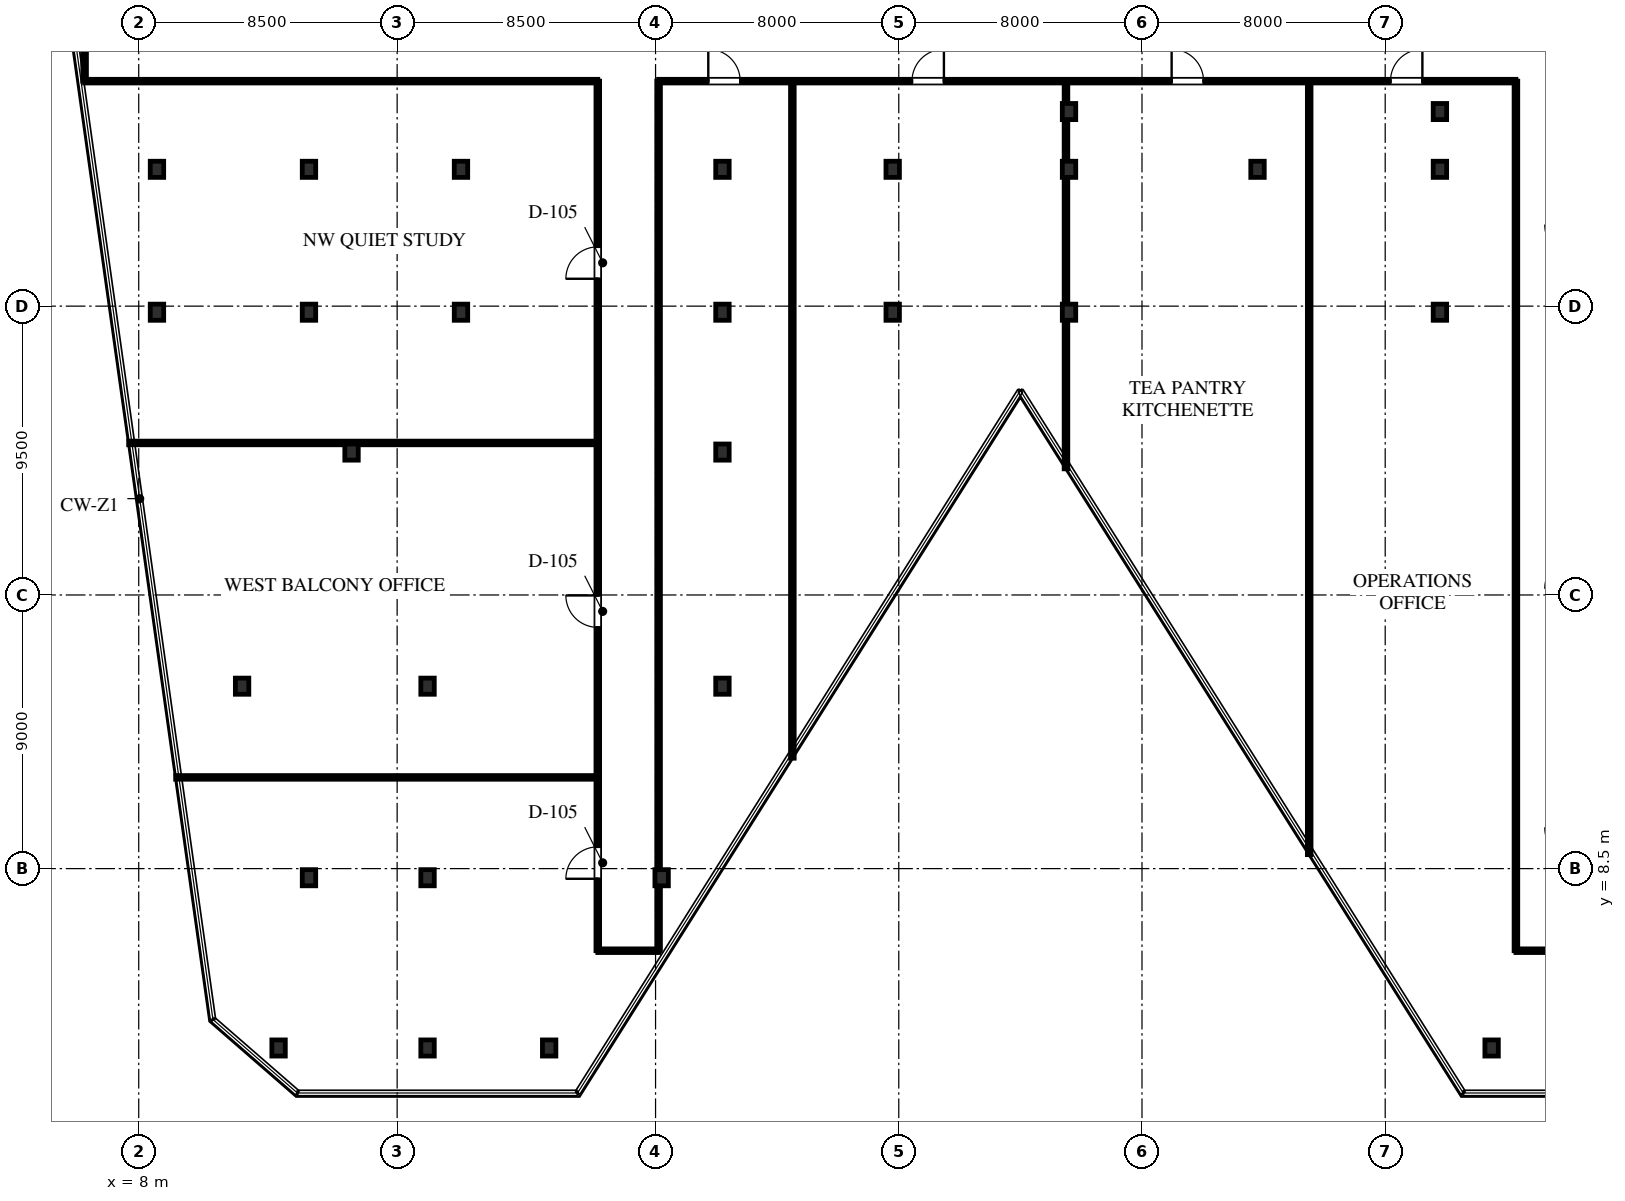
"""IFC4 building model, lengths in metres.
Left out: names, types, materials, properties, quantities, classifications, styles, units other than length and angle.
Written with IfcOpenShell. Run it as: python <this file> out.ifc"""

import sys

from ifc_helpers import new_model, si_unit, direction, frame, frame_2d, origin, origin_2d, place, context, subcontext, project, spatial, rectangle, i_section, extrude, element, fill, save


model = new_model("IFC4")
c1 = context("Model", 3, precision=1e-05, world=origin(), true_north=direction((0.0, 1.0)))
c2 = subcontext(c1, "Body", "Model", "MODEL_VIEW")
j1 = project(units=[si_unit("LENGTHUNIT", "METRE"), si_unit("PLANEANGLEUNIT", "RADIAN")], contexts=[c1])
p1 = place(None, origin())
s1 = spatial("IfcSite", under=j1, at=p1, CompositionType="ELEMENT")
p2 = place(p1, origin())
s2 = spatial("IfcBuilding", under=s1, at=p2, CompositionType="ELEMENT")
p3 = place(p2, frame((0.0, 0.0, 45.5)))
s3 = spatial("IfcBuildingStorey", under=s2, at=p3, CompositionType="ELEMENT", Elevation=45.5)
for number, where, z_axis, x_axis in (
    (1, (12.6, 2.6, 0.0), (0.0, 0.0, 1.0), (1.0, 0.0, 0.0)),
    (2, (15.0, 22.2, 0.0), (0.0, 0.0, 1.0), (1.0, 0.0, 0.0)),
    (3, (27.2, 22.2, 0.0), (0.0, 0.0, 1.0), (1.0, 0.0, 0.0)),
    (4, (8.6, 26.8, 0.0), (0.0, 0.0, 1.0), (1.0, 0.0, 0.0)),
    (5, (13.6, 26.8, 0.0), (0.0, 0.0, 1.0), (1.0, 0.0, 0.0)),
    (6, (18.6, 26.8, 0.0), (0.0, 0.0, 1.0), (1.0, 0.0, 0.0)),
    (7, (27.2, 26.8, 0.0), (0.0, 0.0, 1.0), (1.0, 0.0, 0.0)),
    (8, (32.8, 26.8, 0.0), (0.0, 0.0, 1.0), (1.0, 0.0, 0.0)),
    (9, (38.6, 26.8, 0.0), (0.0, 0.0, 1.0), (1.0, 0.0, 0.0)),
    (10, (50.8, 26.8, 0.0), (0.0, 0.0, 1.0), (1.0, 0.0, 0.0)),
    (11, (8.6, 31.5, 0.0), (0.0, 0.0, 1.0), (1.0, 0.0, 0.0)),
    (12, (13.6, 31.5, 0.0), (0.0, 0.0, 1.0), (1.0, 0.0, 0.0)),
    (13, (17.5, 2.6, 0.0), (0.0, 0.0, 1.0), (1.0, 0.0, 0.0)),
    (14, (18.6, 31.5, 0.0), (0.0, 0.0, 1.0), (1.0, 0.0, 0.0)),
    (15, (27.2, 31.5, 0.0), (0.0, 0.0, 1.0), (1.0, 0.0, 0.0)),
    (16, (32.8, 31.5, 0.0), (0.0, 0.0, 1.0), (1.0, 0.0, 0.0)),
    (17, (38.6, 31.5, 0.0), (0.0, 0.0, 1.0), (1.0, 0.0, 0.0)),
    (18, (44.8, 31.5, 0.0), (0.0, 0.0, 1.0), (1.0, 0.0, 0.0)),
    (19, (50.8, 31.5, 0.0), (0.0, 0.0, 1.0), (1.0, 0.0, 0.0)),
    (20, (21.5, 2.6, 0.0), (0.0, 0.0, 1.0), (1.0, 0.0, 0.0)),
    (21, (52.5, 2.6, 0.0), (0.0, 0.0, 1.0), (1.0, 0.0, 0.0)),
    (22, (13.6, 8.2, 0.0), (0.0, 0.0, 1.0), (1.0, 0.0, 0.0)),
    (23, (17.5, 8.2, 0.0), (0.0, 0.0, 1.0), (1.0, 0.0, 0.0)),
    (24, (25.2, 8.2, 0.0), (0.0, 0.0, 1.0), (1.0, 0.0, 0.0)),
    (25, (11.4, 14.5, 0.0), (0.0, 0.0, 1.0), (1.0, 0.0, 0.0)),
    (26, (17.5, 14.5, 0.0), (0.0, 0.0, 1.0), (1.0, 0.0, 0.0)),
    (27, (27.2, 14.5, 0.0), (0.0, 0.0, 1.0), (1.0, 0.0, 0.0)),
    (28, (38.6, 33.4, 0.0), (0.0, 0.0, 1.0), (1.0, 0.0, 0.0)),
    (29, (50.8, 33.4, 0.0), (0.0, 0.0, 1.0), (1.0, 0.0, 0.0)),
):
    element("IfcColumn", number, at=place(p3, frame(where, z_axis=z_axis, x_axis=x_axis)), inside=s3, PredefinedType="COLUMN", context=c2, shape_type="SweptSolid", body=[
        extrude(i_section(OverallWidth=0.442, OverallDepth=0.531, WebThickness=0.066, FlangeThickness=0.106, FilletRadius=0.03, at=origin_2d()), origin(), (0.0, 0.0, 1.0), 4.0),
    ])
p4 = place(p3, frame((6.22, 34.4, 0.0), z_axis=(0.0, 0.0, 1.0), x_axis=(1.0, 0.0, 0.0)))
e30 = element("IfcWall", 30, at=p4, inside=s3, PredefinedType="PARTITIONING", context=c2, shape_type="SweptSolid", body=[
    extrude(rectangle(XDim=16.88, YDim=0.12, at=frame_2d((8.44, 0.0))), origin(), (0.0, 0.0, 1.0), 2.813),
])
p5 = place(p3, frame((25.1, 34.4, 0.0), z_axis=(0.0, 0.0, 1.0), x_axis=(1.0, 0.0, 0.0)))
e31 = element("IfcWall", 31, at=p5, inside=s3, PredefinedType="PARTITIONING", context=c2, shape_type="SweptSolid", body=[
    extrude(rectangle(XDim=28.2, YDim=0.12, at=frame_2d((14.1, 0.0))), origin(), (0.0, 0.0, 1.0), 2.813),
])
p6 = place(p5, frame((1.634, 0.0, 0.0)))
e32 = element("IfcOpeningElement", 32, at=p6, cuts=e31, PredefinedType="OPENING", context=c2, shape_type="SweptSolid", body=[
    extrude(rectangle(XDim=1.05, YDim=2.2, at=frame_2d((0.525, 1.1))), frame((0.0, 0.07, 0.0), z_axis=(0.0, -1.0, 0.0), x_axis=(1.0, 0.0, 0.0)), (0.0, 0.0, 1.0), 0.14),
])
p7 = place(p5, frame((8.335, 0.0, 0.0)))
e33 = element("IfcOpeningElement", 33, at=p7, cuts=e31, PredefinedType="OPENING", context=c2, shape_type="SweptSolid", body=[
    extrude(rectangle(XDim=1.05, YDim=2.2, at=frame_2d((0.525, 1.1))), frame((0.0, 0.07, 0.0), z_axis=(0.0, -1.0, 0.0), x_axis=(1.0, 0.0, 0.0)), (0.0, 0.0, 1.0), 0.14),
])
p8 = place(p5, frame((16.875, 0.0, 0.0)))
e34 = element("IfcOpeningElement", 34, at=p8, cuts=e31, PredefinedType="OPENING", context=c2, shape_type="SweptSolid", body=[
    extrude(rectangle(XDim=1.05, YDim=2.2, at=frame_2d((0.525, 1.1))), frame((0.0, 0.07, 0.0), z_axis=(0.0, -1.0, 0.0), x_axis=(1.0, 0.0, 0.0)), (0.0, 0.0, 1.0), 0.14),
])
p9 = place(p5, frame((24.073, 0.0, 0.0)))
e35 = element("IfcOpeningElement", 35, at=p9, cuts=e31, PredefinedType="OPENING", context=c2, shape_type="SweptSolid", body=[
    extrude(rectangle(XDim=1.05, YDim=2.2, at=frame_2d((0.525, 1.1))), frame((0.0, 0.07, 0.0), z_axis=(0.0, -1.0, 0.0), x_axis=(1.0, 0.0, 0.0)), (0.0, 0.0, 1.0), 0.14),
])
p10 = place(p3, frame((6.22, 34.4, 0.0), z_axis=(0.0, 0.0, 1.0), x_axis=(0.0, 1.0, 0.0)))
e36 = element("IfcWall", 36, at=p10, inside=s3, PredefinedType="PARTITIONING", context=c2, shape_type="SweptSolid", body=[
    extrude(rectangle(XDim=3.65, YDim=0.12, at=frame_2d((1.825, 0.0))), origin(), (0.0, 0.0, 1.0), 3.74),
])
p11 = place(p3, frame((23.1, 5.8, 0.0), z_axis=(0.0, 0.0, 1.0), x_axis=(0.0, 1.0, 0.0)))
e37 = element("IfcWall", 37, at=p11, inside=s3, PredefinedType="PARTITIONING", context=c2, shape_type="SweptSolid", body=[
    extrude(rectangle(XDim=28.6, YDim=0.12, at=frame_2d((14.3, 0.0))), origin(), (0.0, 0.0, 1.0), 2.813),
])
p12 = place(p11, frame((2.365, 0.0, 0.0)))
e38 = element("IfcOpeningElement", 38, at=p12, cuts=e37, PredefinedType="OPENING", context=c2, shape_type="SweptSolid", body=[
    extrude(rectangle(XDim=1.05, YDim=2.2, at=frame_2d((0.525, 1.1))), frame((0.0, 0.07, 0.0), z_axis=(0.0, -1.0, 0.0), x_axis=(1.0, 0.0, 0.0)), (0.0, 0.0, 1.0), 0.14),
])
p13 = place(p11, frame((10.635, 0.0, 0.0)))
e39 = element("IfcOpeningElement", 39, at=p13, cuts=e37, PredefinedType="OPENING", context=c2, shape_type="SweptSolid", body=[
    extrude(rectangle(XDim=1.05, YDim=2.2, at=frame_2d((0.525, 1.1))), frame((0.0, 0.07, 0.0), z_axis=(0.0, -1.0, 0.0), x_axis=(1.0, 0.0, 0.0)), (0.0, 0.0, 1.0), 0.14),
])
p14 = place(p11, frame((22.1, 0.0, 0.0)))
e40 = element("IfcOpeningElement", 40, at=p14, cuts=e37, PredefinedType="OPENING", context=c2, shape_type="SweptSolid", body=[
    extrude(rectangle(XDim=1.05, YDim=2.2, at=frame_2d((0.525, 1.1))), frame((0.0, 0.07, 0.0), z_axis=(0.0, -1.0, 0.0), x_axis=(1.0, 0.0, 0.0)), (0.0, 0.0, 1.0), 0.14),
])
p15 = place(p3, frame((25.1, 5.8, 0.0), z_axis=(0.0, 0.0, 1.0), x_axis=(0.0, 1.0, 0.0)))
e41 = element("IfcWall", 41, at=p15, inside=s3, PredefinedType="PARTITIONING", context=c2, shape_type="SweptSolid", body=[
    extrude(rectangle(XDim=28.6, YDim=0.12, at=frame_2d((14.3, 0.0))), origin(), (0.0, 0.0, 1.0), 2.813),
])
p16 = place(p3, frame((23.1, 5.8, 0.0), z_axis=(0.0, 0.0, 1.0), x_axis=(1.0, 0.0, 0.0)))
e42 = element("IfcWall", 42, at=p16, inside=s3, PredefinedType="PARTITIONING", context=c2, shape_type="SweptSolid", body=[
    extrude(rectangle(XDim=2.0, YDim=0.12, at=frame_2d((1.0, 0.0))), origin(), (0.0, 0.0, 1.0), 2.978),
])
p17 = place(p3, frame((53.3, 5.8, 0.0), z_axis=(0.0, 0.0, 1.0), x_axis=(0.0, 1.0, 0.0)))
e43 = element("IfcWall", 43, at=p17, inside=s3, PredefinedType="PARTITIONING", context=c2, shape_type="SweptSolid", body=[
    extrude(rectangle(XDim=28.6, YDim=0.12, at=frame_2d((14.3, 0.0))), origin(), (0.0, 0.0, 1.0), 2.813),
])
p18 = place(p3, frame((53.3, 5.8, 0.0), z_axis=(0.0, 0.0, 1.0), x_axis=(1.0, 0.0, 0.0)))
e44 = element("IfcWall", 44, at=p18, inside=s3, PredefinedType="PARTITIONING", context=c2, shape_type="SweptSolid", body=[
    extrude(rectangle(XDim=2.0, YDim=0.12, at=frame_2d((1.0, 0.0))), origin(), (0.0, 0.0, 1.0), 2.978),
])
p19 = place(p3, frame((9.215, 11.5, 0.0), z_axis=(0.0, 0.0, 1.0), x_axis=(1.0, 0.0, 0.0)))
e45 = element("IfcWall", 45, at=p19, inside=s3, PredefinedType="PARTITIONING", context=c2, shape_type="SweptSolid", body=[
    extrude(rectangle(XDim=13.817, YDim=0.12, at=frame_2d((6.908, 0.0))), origin(), (0.0, 0.0, 1.0), 2.813),
])
p20 = place(p3, frame((7.669, 22.5, 0.0), z_axis=(0.0, 0.0, 1.0), x_axis=(1.0, 0.0, 0.0)))
e46 = element("IfcWall", 46, at=p20, inside=s3, PredefinedType="PARTITIONING", context=c2, shape_type="SweptSolid", body=[
    extrude(rectangle(XDim=15.363, YDim=0.12, at=frame_2d((7.681, 0.0))), origin(), (0.0, 0.0, 1.0), 2.978),
])
p21 = place(p3, frame((29.5, 12.132, 0.0), z_axis=(0.0, 0.0, 1.0), x_axis=(0.0, 1.0, 0.0)))
e47 = element("IfcWall", 47, at=p21, inside=s3, PredefinedType="PARTITIONING", context=c2, shape_type="SweptSolid", body=[
    extrude(rectangle(XDim=22.2, YDim=0.12, at=frame_2d((11.1, 0.0))), origin(), (0.0, 0.0, 1.0), 2.813),
])
p22 = place(p3, frame((38.5, 21.649, 0.0), z_axis=(0.0, 0.0, 1.0), x_axis=(0.0, 1.0, 0.0)))
e48 = element("IfcWall", 48, at=p22, inside=s3, PredefinedType="PARTITIONING", context=c2, shape_type="SweptSolid", body=[
    extrude(rectangle(XDim=12.683, YDim=0.12, at=frame_2d((6.342, 0.0))), origin(), (0.0, 0.0, 1.0), 2.813),
])
p23 = place(p3, frame((46.5, 8.959, 0.0), z_axis=(0.0, 0.0, 1.0), x_axis=(0.0, 1.0, 0.0)))
e49 = element("IfcWall", 49, at=p23, inside=s3, PredefinedType="PARTITIONING", context=c2, shape_type="SweptSolid", body=[
    extrude(rectangle(XDim=25.373, YDim=0.12, at=frame_2d((12.687, 0.0))), origin(), (0.0, 0.0, 1.0), 2.813),
])
p24 = place(p12, origin())
e50 = element("IfcDoor", 50, at=p24, inside=s3, OperationType="SINGLE_SWING_LEFT", PredefinedType="DOOR", context=c2, shape_type="SweptSolid", body=[
    extrude(rectangle(XDim=1.05, YDim=2.2, at=frame_2d((0.525, 1.1))), frame((0.0, 0.025, 0.0), z_axis=(0.0, -1.0, 0.0), x_axis=(1.0, 0.0, 0.0)), (0.0, 0.0, 1.0), 0.05),
])
fill(e38, e50)
p25 = place(p13, origin())
e51 = element("IfcDoor", 51, at=p25, inside=s3, OperationType="SINGLE_SWING_RIGHT", PredefinedType="DOOR", context=c2, shape_type="SweptSolid", body=[
    extrude(rectangle(XDim=1.05, YDim=2.2, at=frame_2d((0.525, 1.1))), frame((0.0, 0.025, 0.0), z_axis=(0.0, -1.0, 0.0), x_axis=(1.0, 0.0, 0.0)), (0.0, 0.0, 1.0), 0.05),
])
fill(e39, e51)
p26 = place(p14, origin())
e52 = element("IfcDoor", 52, at=p26, inside=s3, OperationType="SINGLE_SWING_LEFT", PredefinedType="DOOR", context=c2, shape_type="SweptSolid", body=[
    extrude(rectangle(XDim=1.05, YDim=2.2, at=frame_2d((0.525, 1.1))), frame((0.0, 0.025, 0.0), z_axis=(0.0, -1.0, 0.0), x_axis=(1.0, 0.0, 0.0)), (0.0, 0.0, 1.0), 0.05),
])
fill(e40, e52)
p27 = place(p6, origin())
e53 = element("IfcDoor", 53, at=p27, inside=s3, OperationType="SINGLE_SWING_LEFT", PredefinedType="DOOR", context=c2, shape_type="SweptSolid", body=[
    extrude(rectangle(XDim=1.05, YDim=2.2, at=frame_2d((0.525, 1.1))), frame((0.0, 0.025, 0.0), z_axis=(0.0, -1.0, 0.0), x_axis=(1.0, 0.0, 0.0)), (0.0, 0.0, 1.0), 0.05),
])
fill(e32, e53)
p28 = place(p7, origin())
e54 = element("IfcDoor", 54, at=p28, inside=s3, OperationType="SINGLE_SWING_RIGHT", PredefinedType="DOOR", context=c2, shape_type="SweptSolid", body=[
    extrude(rectangle(XDim=1.05, YDim=2.2, at=frame_2d((0.525, 1.1))), frame((0.0, 0.025, 0.0), z_axis=(0.0, -1.0, 0.0), x_axis=(1.0, 0.0, 0.0)), (0.0, 0.0, 1.0), 0.05),
])
fill(e33, e54)
p29 = place(p8, origin())
e55 = element("IfcDoor", 55, at=p29, inside=s3, OperationType="SINGLE_SWING_LEFT", PredefinedType="DOOR", context=c2, shape_type="SweptSolid", body=[
    extrude(rectangle(XDim=1.05, YDim=2.2, at=frame_2d((0.525, 1.1))), frame((0.0, 0.025, 0.0), z_axis=(0.0, -1.0, 0.0), x_axis=(1.0, 0.0, 0.0)), (0.0, 0.0, 1.0), 0.05),
])
fill(e34, e55)
p30 = place(p9, origin())
e56 = element("IfcDoor", 56, at=p30, inside=s3, OperationType="SINGLE_SWING_RIGHT", PredefinedType="DOOR", context=c2, shape_type="SweptSolid", body=[
    extrude(rectangle(XDim=1.05, YDim=2.2, at=frame_2d((0.525, 1.1))), frame((0.0, 0.025, 0.0), z_axis=(0.0, -1.0, 0.0), x_axis=(1.0, 0.0, 0.0)), (0.0, 0.0, 1.0), 0.05),
])
fill(e35, e56)
save(model, sys.argv[1])
